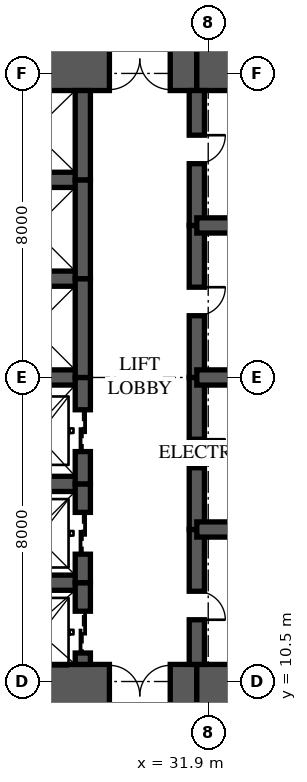
"""IFC4 building model, lengths in metres.
Left out: names, types, materials, properties, quantities, classifications, styles, units other than length and angle.
Written with IfcOpenShell. Run it as: python <this file> out.ifc"""

import sys

from ifc_helpers import new_model, si_unit, direction, frame, frame_2d, origin, place, context, subcontext, project, spatial, rectangle, extrude, element, fill, save


model = new_model("IFC4")
c1 = context("Model", 3, precision=1e-05, world=origin(), true_north=direction((0.0, 1.0)))
c2 = subcontext(c1, "Body", "Model", "MODEL_VIEW")
j1 = project(units=[si_unit("LENGTHUNIT", "METRE"), si_unit("PLANEANGLEUNIT", "RADIAN")], contexts=[c1])
p1 = place(None, origin())
s1 = spatial("IfcSite", under=j1, at=p1, CompositionType="ELEMENT")
p2 = place(p1, origin())
s2 = spatial("IfcBuilding", under=s1, at=p2, CompositionType="ELEMENT")
p3 = place(p2, frame((0.0, 0.0, 21.0)))
s3 = spatial("IfcBuildingStorey", under=s2, at=p3, CompositionType="ELEMENT", Elevation=21.0)
p4 = place(p3, frame((26.0, 10.125, 0.0), z_axis=(0.0, 0.0, 1.0), x_axis=(1.0, 0.0, 0.0)))
e1 = element("IfcWall", 1, at=p4, inside=s3, PredefinedType="SHEAR", context=c2, shape_type="SweptSolid", body=[
    extrude(rectangle(XDim=5.6, YDim=1.65, at=frame_2d((2.8, 0.0))), origin(), (0.0, 0.0, 1.0), 3.35),
])
p5 = place(p4, frame((3.3, 0.0, 0.0)))
e2 = element("IfcOpeningElement", 2, at=p5, cuts=e1, PredefinedType="OPENING", context=c2, shape_type="SweptSolid", body=[
    extrude(rectangle(XDim=1.6, YDim=2.1, at=frame_2d((0.8, 1.05))), frame((0.0, 0.835, 0.0), z_axis=(0.0, -1.0, 0.0), x_axis=(1.0, 0.0, 0.0)), (0.0, 0.0, 1.0), 1.67),
])
for number, where, z_axis, x_axis in (
    (3, (31.6, 10.125, 0.0), (0.0, 0.0, 1.0), (1.0, 0.0, 0.0)),
    (4, (35.9, 26.875, 0.0), (0.0, 0.0, 1.0), (-1.0, 0.0, 0.0)),
):
    element("IfcWall", number, at=place(p3, frame(where, z_axis=z_axis, x_axis=x_axis)), inside=s3, PredefinedType="SHEAR", context=c2, shape_type="SweptSolid", body=[
        extrude(rectangle(XDim=4.3, YDim=1.65, at=frame_2d((2.15, 0.0))), origin(), (0.0, 0.0, 1.0), 3.35),
    ])
p6 = place(p3, frame((31.6, 26.875, 0.0), z_axis=(0.0, 0.0, 1.0), x_axis=(-1.0, 0.0, 0.0)))
e5 = element("IfcWall", 5, at=p6, inside=s3, PredefinedType="SHEAR", context=c2, shape_type="SweptSolid", body=[
    extrude(rectangle(XDim=5.6, YDim=1.65, at=frame_2d((2.8, 0.0))), origin(), (0.0, 0.0, 1.0), 3.35),
])
p7 = place(p6, frame((0.7, 0.0, 0.0)))
e6 = element("IfcOpeningElement", 6, at=p7, cuts=e5, PredefinedType="OPENING", context=c2, shape_type="SweptSolid", body=[
    extrude(rectangle(XDim=1.6, YDim=2.1, at=frame_2d((0.8, 1.05))), frame((0.0, 0.835, 0.0), z_axis=(0.0, -1.0, 0.0), x_axis=(1.0, 0.0, 0.0)), (0.0, 0.0, 1.0), 1.67),
])
p8 = place(p3, frame((28.6, 10.95, 0.0), z_axis=(0.0, 0.0, 1.0), x_axis=(0.0, 1.0, 0.0)))
e7 = element("IfcWall", 7, at=p8, inside=s3, PredefinedType="SHEAR", context=c2, shape_type="SweptSolid", body=[
    extrude(rectangle(XDim=2.15, YDim=0.4, at=frame_2d((1.075, 0.0))), origin(), (0.0, 0.0, 1.0), 3.35),
])
p9 = place(p8, frame((0.3, 0.0, 0.0)))
e8 = element("IfcOpeningElement", 8, at=p9, cuts=e7, PredefinedType="OPENING", context=c2, shape_type="SweptSolid", body=[
    extrude(rectangle(XDim=1.1, YDim=2.1, at=frame_2d((0.55, 1.05))), frame((0.0, 0.21, 0.0), z_axis=(0.0, -1.0, 0.0), x_axis=(1.0, 0.0, 0.0)), (0.0, 0.0, 1.0), 0.42),
])
p10 = place(p3, frame((28.6, 13.1, 0.0), z_axis=(0.0, 0.0, 1.0), x_axis=(0.0, 1.0, 0.0)))
e9 = element("IfcWall", 9, at=p10, inside=s3, PredefinedType="SHEAR", context=c2, shape_type="SweptSolid", body=[
    extrude(rectangle(XDim=2.6, YDim=0.4, at=frame_2d((1.3, 0.0))), origin(), (0.0, 0.0, 1.0), 3.35),
])
p11 = place(p10, frame((0.75, 0.0, 0.0)))
e10 = element("IfcOpeningElement", 10, at=p11, cuts=e9, PredefinedType="OPENING", context=c2, shape_type="SweptSolid", body=[
    extrude(rectangle(XDim=1.1, YDim=2.1, at=frame_2d((0.55, 1.05))), frame((0.0, 0.21, 0.0), z_axis=(0.0, -1.0, 0.0), x_axis=(1.0, 0.0, 0.0)), (0.0, 0.0, 1.0), 0.42),
])
p12 = place(p3, frame((28.6, 15.7, 0.0), z_axis=(0.0, 0.0, 1.0), x_axis=(0.0, 1.0, 0.0)))
e11 = element("IfcWall", 11, at=p12, inside=s3, PredefinedType="SHEAR", context=c2, shape_type="SweptSolid", body=[
    extrude(rectangle(XDim=2.8, YDim=0.4, at=frame_2d((1.4, 0.0))), origin(), (0.0, 0.0, 1.0), 3.35),
])
p13 = place(p12, frame((0.85, 0.0, 0.0)))
e12 = element("IfcOpeningElement", 12, at=p13, cuts=e11, PredefinedType="OPENING", context=c2, shape_type="SweptSolid", body=[
    extrude(rectangle(XDim=1.1, YDim=2.1, at=frame_2d((0.55, 1.05))), frame((0.0, 0.21, 0.0), z_axis=(0.0, -1.0, 0.0), x_axis=(1.0, 0.0, 0.0)), (0.0, 0.0, 1.0), 0.42),
])
p14 = place(p3, frame((28.6, 18.5, 0.0), z_axis=(0.0, 0.0, 1.0), x_axis=(0.0, 1.0, 0.0)))
e13 = element("IfcWall", 13, at=p14, inside=s3, PredefinedType="SHEAR", context=c2, shape_type="SweptSolid", body=[
    extrude(rectangle(XDim=2.6, YDim=0.4, at=frame_2d((1.3, 0.0))), origin(), (0.0, 0.0, 1.0), 3.35),
])
p15 = place(p3, frame((28.6, 21.1, 0.0), z_axis=(0.0, 0.0, 1.0), x_axis=(0.0, 1.0, 0.0)))
e14 = element("IfcWall", 14, at=p15, inside=s3, PredefinedType="SHEAR", context=c2, shape_type="SweptSolid", body=[
    extrude(rectangle(XDim=2.6, YDim=0.4, at=frame_2d((1.3, 0.0))), origin(), (0.0, 0.0, 1.0), 3.35),
])
p16 = place(p3, frame((28.6, 23.7, 0.0), z_axis=(0.0, 0.0, 1.0), x_axis=(0.0, 1.0, 0.0)))
e15 = element("IfcWall", 15, at=p16, inside=s3, PredefinedType="SHEAR", context=c2, shape_type="SweptSolid", body=[
    extrude(rectangle(XDim=2.35, YDim=0.4, at=frame_2d((1.175, 0.0))), origin(), (0.0, 0.0, 1.0), 3.35),
])
p17 = place(p3, frame((31.6, 10.95, 0.0), z_axis=(0.0, 0.0, 1.0), x_axis=(0.0, 1.0, 0.0)))
e16 = element("IfcWall", 16, at=p17, inside=s3, PredefinedType="SHEAR", context=c2, shape_type="SweptSolid", body=[
    extrude(rectangle(XDim=3.55, YDim=0.4, at=frame_2d((1.775, 0.0))), origin(), (0.0, 0.0, 1.0), 3.35),
])
p18 = place(p17, frame((1.175, 0.0, 0.0)))
e17 = element("IfcOpeningElement", 17, at=p18, cuts=e16, PredefinedType="OPENING", context=c2, shape_type="SweptSolid", body=[
    extrude(rectangle(XDim=0.75, YDim=2.1, at=frame_2d((0.375, 1.05))), frame((0.0, 0.21, 0.0), z_axis=(0.0, -1.0, 0.0), x_axis=(1.0, 0.0, 0.0)), (0.0, 0.0, 1.0), 0.42),
])
p19 = place(p3, frame((31.6, 14.5, 0.0), z_axis=(0.0, 0.0, 1.0), x_axis=(0.0, 1.0, 0.0)))
e18 = element("IfcWall", 18, at=p19, inside=s3, PredefinedType="SHEAR", context=c2, shape_type="SweptSolid", body=[
    extrude(rectangle(XDim=4.0, YDim=0.4, at=frame_2d((2.0, 0.0))), origin(), (0.0, 0.0, 1.0), 3.35),
])
p20 = place(p19, frame((1.625, 0.0, 0.0)))
e19 = element("IfcOpeningElement", 19, at=p20, cuts=e18, PredefinedType="OPENING", context=c2, shape_type="SweptSolid", body=[
    extrude(rectangle(XDim=0.75, YDim=2.1, at=frame_2d((0.375, 1.05))), frame((0.0, 0.21, 0.0), z_axis=(0.0, -1.0, 0.0), x_axis=(1.0, 0.0, 0.0)), (0.0, 0.0, 1.0), 0.42),
])
p21 = place(p3, frame((31.6, 18.5, 0.0), z_axis=(0.0, 0.0, 1.0), x_axis=(0.0, 1.0, 0.0)))
e20 = element("IfcWall", 20, at=p21, inside=s3, PredefinedType="SHEAR", context=c2, shape_type="SweptSolid", body=[
    extrude(rectangle(XDim=4.0, YDim=0.4, at=frame_2d((2.0, 0.0))), origin(), (0.0, 0.0, 1.0), 3.35),
])
p22 = place(p21, frame((1.625, 0.0, 0.0)))
e21 = element("IfcOpeningElement", 21, at=p22, cuts=e20, PredefinedType="OPENING", context=c2, shape_type="SweptSolid", body=[
    extrude(rectangle(XDim=0.75, YDim=2.1, at=frame_2d((0.375, 1.05))), frame((0.0, 0.21, 0.0), z_axis=(0.0, -1.0, 0.0), x_axis=(1.0, 0.0, 0.0)), (0.0, 0.0, 1.0), 0.42),
])
p23 = place(p3, frame((31.6, 22.5, 0.0), z_axis=(0.0, 0.0, 1.0), x_axis=(0.0, 1.0, 0.0)))
e22 = element("IfcWall", 22, at=p23, inside=s3, PredefinedType="SHEAR", context=c2, shape_type="SweptSolid", body=[
    extrude(rectangle(XDim=3.55, YDim=0.4, at=frame_2d((1.775, 0.0))), origin(), (0.0, 0.0, 1.0), 3.35),
])
p24 = place(p23, frame((1.625, 0.0, 0.0)))
e23 = element("IfcOpeningElement", 23, at=p24, cuts=e22, PredefinedType="OPENING", context=c2, shape_type="SweptSolid", body=[
    extrude(rectangle(XDim=0.75, YDim=2.1, at=frame_2d((0.375, 1.05))), frame((0.0, 0.21, 0.0), z_axis=(0.0, -1.0, 0.0), x_axis=(1.0, 0.0, 0.0)), (0.0, 0.0, 1.0), 0.42),
])
for number, where, z_axis, x_axis in (
    (24, (26.0, 13.1, 0.0), (0.0, 0.0, 1.0), (1.0, 0.0, 0.0)),
    (25, (26.0, 15.7, 0.0), (0.0, 0.0, 1.0), (1.0, 0.0, 0.0)),
    (26, (26.0, 18.5, 0.0), (0.0, 0.0, 1.0), (1.0, 0.0, 0.0)),
    (27, (26.0, 21.1, 0.0), (0.0, 0.0, 1.0), (1.0, 0.0, 0.0)),
    (28, (26.0, 23.7, 0.0), (0.0, 0.0, 1.0), (1.0, 0.0, 0.0)),
):
    element("IfcWall", number, at=place(p3, frame(where, z_axis=z_axis, x_axis=x_axis)), inside=s3, PredefinedType="SHEAR", context=c2, shape_type="SweptSolid", body=[
        extrude(rectangle(XDim=2.6, YDim=0.4, at=frame_2d((1.3, 0.0))), origin(), (0.0, 0.0, 1.0), 3.35),
    ])
for number, where, z_axis, x_axis in (
    (29, (31.6, 14.5, 0.0), (0.0, 0.0, 1.0), (1.0, 0.0, 0.0)),
    (30, (31.6, 18.5, 0.0), (0.0, 0.0, 1.0), (1.0, 0.0, 0.0)),
    (31, (31.6, 22.5, 0.0), (0.0, 0.0, 1.0), (1.0, 0.0, 0.0)),
):
    element("IfcWall", number, at=place(p3, frame(where, z_axis=z_axis, x_axis=x_axis)), inside=s3, PredefinedType="SHEAR", context=c2, shape_type="SweptSolid", body=[
        extrude(rectangle(XDim=4.3, YDim=0.4, at=frame_2d((2.15, 0.0))), origin(), (0.0, 0.0, 1.0), 3.35),
    ])
p25 = place(p9, origin())
e32 = element("IfcDoor", 32, at=p25, inside=s3, OperationType="SLIDING_TO_LEFT", PredefinedType="DOOR", context=c2, shape_type="SweptSolid", body=[
    extrude(rectangle(XDim=1.1, YDim=2.1, at=frame_2d((0.55, 1.05))), frame((0.0, 0.025, 0.0), z_axis=(0.0, -1.0, 0.0), x_axis=(1.0, 0.0, 0.0)), (0.0, 0.0, 1.0), 0.05),
])
fill(e8, e32)
p26 = place(p11, origin())
e33 = element("IfcDoor", 33, at=p26, inside=s3, OperationType="SLIDING_TO_LEFT", PredefinedType="DOOR", context=c2, shape_type="SweptSolid", body=[
    extrude(rectangle(XDim=1.1, YDim=2.1, at=frame_2d((0.55, 1.05))), frame((0.0, 0.025, 0.0), z_axis=(0.0, -1.0, 0.0), x_axis=(1.0, 0.0, 0.0)), (0.0, 0.0, 1.0), 0.05),
])
fill(e10, e33)
p27 = place(p13, origin())
e34 = element("IfcDoor", 34, at=p27, inside=s3, OperationType="SLIDING_TO_LEFT", PredefinedType="DOOR", context=c2, shape_type="SweptSolid", body=[
    extrude(rectangle(XDim=1.1, YDim=2.1, at=frame_2d((0.55, 1.05))), frame((0.0, 0.025, 0.0), z_axis=(0.0, -1.0, 0.0), x_axis=(1.0, 0.0, 0.0)), (0.0, 0.0, 1.0), 0.05),
])
fill(e12, e34)
p28 = place(p5, origin())
e35 = element("IfcDoor", 35, at=p28, inside=s3, OperationType="DOUBLE_DOOR_SINGLE_SWING", PredefinedType="DOOR", context=c2, shape_type="SweptSolid", body=[
    extrude(rectangle(XDim=1.6, YDim=2.1, at=frame_2d((0.8, 1.05))), frame((0.0, 0.025, 0.0), z_axis=(0.0, -1.0, 0.0), x_axis=(1.0, 0.0, 0.0)), (0.0, 0.0, 1.0), 0.05),
])
fill(e2, e35)
p29 = place(p7, origin())
e36 = element("IfcDoor", 36, at=p29, inside=s3, OperationType="DOUBLE_DOOR_SINGLE_SWING", PredefinedType="DOOR", context=c2, shape_type="SweptSolid", body=[
    extrude(rectangle(XDim=1.6, YDim=2.1, at=frame_2d((0.8, 1.05))), frame((0.0, 0.025, 0.0), z_axis=(0.0, -1.0, 0.0), x_axis=(1.0, 0.0, 0.0)), (0.0, 0.0, 1.0), 0.05),
])
fill(e6, e36)
p30 = place(p18, frame((0.75, 0.0, 0.0), z_axis=(0.0, 0.0, 1.0), x_axis=(-1.0, 0.0, 0.0)))
e37 = element("IfcDoor", 37, at=p30, inside=s3, OperationType="SINGLE_SWING_RIGHT", PredefinedType="DOOR", context=c2, shape_type="SweptSolid", body=[
    extrude(rectangle(XDim=0.75, YDim=2.1, at=frame_2d((0.375, 1.05))), frame((0.0, 0.025, 0.0), z_axis=(0.0, -1.0, 0.0), x_axis=(1.0, 0.0, 0.0)), (0.0, 0.0, 1.0), 0.05),
])
fill(e17, e37)
p31 = place(p20, frame((0.75, 0.0, 0.0), z_axis=(0.0, 0.0, 1.0), x_axis=(-1.0, 0.0, 0.0)))
e38 = element("IfcDoor", 38, at=p31, inside=s3, OperationType="SINGLE_SWING_LEFT", PredefinedType="DOOR", context=c2, shape_type="SweptSolid", body=[
    extrude(rectangle(XDim=0.75, YDim=2.1, at=frame_2d((0.375, 1.05))), frame((0.0, 0.025, 0.0), z_axis=(0.0, -1.0, 0.0), x_axis=(1.0, 0.0, 0.0)), (0.0, 0.0, 1.0), 0.05),
])
fill(e19, e38)
p32 = place(p22, frame((0.75, 0.0, 0.0), z_axis=(0.0, 0.0, 1.0), x_axis=(-1.0, 0.0, 0.0)))
e39 = element("IfcDoor", 39, at=p32, inside=s3, OperationType="SINGLE_SWING_LEFT", PredefinedType="DOOR", context=c2, shape_type="SweptSolid", body=[
    extrude(rectangle(XDim=0.75, YDim=2.1, at=frame_2d((0.375, 1.05))), frame((0.0, 0.025, 0.0), z_axis=(0.0, -1.0, 0.0), x_axis=(1.0, 0.0, 0.0)), (0.0, 0.0, 1.0), 0.05),
])
fill(e21, e39)
p33 = place(p24, frame((0.75, 0.0, 0.0), z_axis=(0.0, 0.0, 1.0), x_axis=(-1.0, 0.0, 0.0)))
e40 = element("IfcDoor", 40, at=p33, inside=s3, OperationType="SINGLE_SWING_LEFT", PredefinedType="DOOR", context=c2, shape_type="SweptSolid", body=[
    extrude(rectangle(XDim=0.75, YDim=2.1, at=frame_2d((0.375, 1.05))), frame((0.0, 0.025, 0.0), z_axis=(0.0, -1.0, 0.0), x_axis=(1.0, 0.0, 0.0)), (0.0, 0.0, 1.0), 0.05),
])
fill(e23, e40)
save(model, sys.argv[1])
